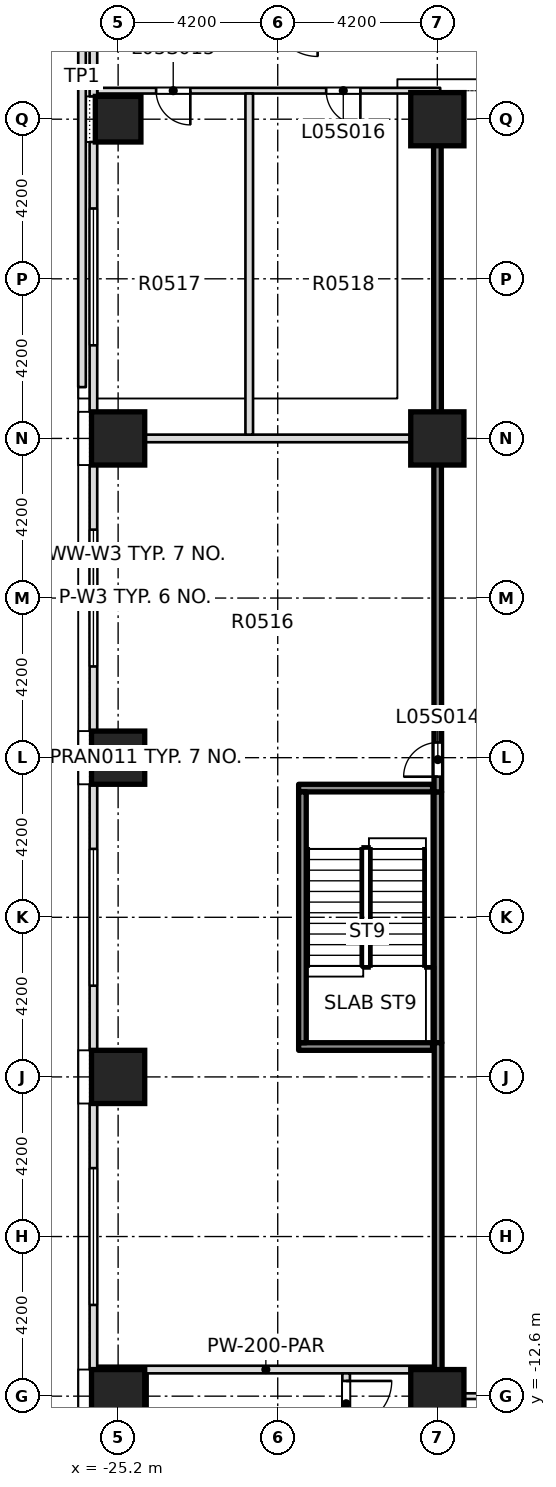
"""IFC4 building model, lengths in metres.
Left out: names, types, materials, properties, quantities, classifications, styles, units other than length and angle.
Written with IfcOpenShell. Run it as: python <this file> out.ifc"""

import sys

from ifc_helpers import new_model, si_unit, direction, frame, frame_2d, origin, origin_2d, place, context, subcontext, project, spatial, rectangle, extrude, element, fill, save


model = new_model("IFC4")
c1 = context("Model", 3, precision=1e-05, world=origin(), true_north=direction((0.0, 1.0)))
c2 = subcontext(c1, "Body", "Model", "MODEL_VIEW")
j1 = project(units=[si_unit("LENGTHUNIT", "METRE"), si_unit("PLANEANGLEUNIT", "RADIAN")], contexts=[c1])
p1 = place(None, origin())
s1 = spatial("IfcSite", under=j1, at=p1, CompositionType="ELEMENT")
p2 = place(p1, origin())
s2 = spatial("IfcBuilding", under=s1, at=p2, CompositionType="ELEMENT")
p3 = place(p2, frame((0.0, 0.0, 30.0)))
s3 = spatial("IfcBuildingStorey", under=s2, at=p3, CompositionType="ELEMENT", Elevation=30.0)
for number, where, z_axis, x_axis in (
    (1, (-25.2, -12.6, -0.4), (0.0, 0.0, 1.0), (1.0, 0.0, 0.0)),
    (2, (-16.8, -12.6, -0.4), (0.0, 0.0, 1.0), (1.0, 0.0, 0.0)),
    (3, (-25.2, -4.2, -0.4), (0.0, 0.0, 1.0), (1.0, 0.0, 0.0)),
    (4, (-25.2, 4.2, -0.4), (0.0, 0.0, 1.0), (1.0, 0.0, 0.0)),
    (5, (-25.2, 12.6, -0.4), (0.0, 0.0, 1.0), (1.0, 0.0, 0.0)),
    (6, (-16.8, 12.6, -0.4), (0.0, 0.0, 1.0), (1.0, 0.0, 0.0)),
    (7, (-16.8, 21.0, -0.4), (0.0, 0.0, 1.0), (1.0, 0.0, 0.0)),
):
    element("IfcColumn", number, at=place(p3, frame(where, z_axis=z_axis, x_axis=x_axis)), inside=s3, PredefinedType="COLUMN", context=c2, shape_type="SweptSolid", body=[
        extrude(rectangle(XDim=1.4, YDim=1.4, at=origin_2d()), origin(), (0.0, 0.0, 1.0), 4.58),
    ])
p4 = place(p3, frame((-25.2, 21.0, 0.0), z_axis=(0.0, 0.0, 1.0), x_axis=(1.0, 0.0, 0.0)))
e8 = element("IfcColumn", 8, at=p4, inside=s3, PredefinedType="COLUMN", context=c2, shape_type="SweptSolid", body=[
    extrude(rectangle(XDim=1.2, YDim=1.2, at=origin_2d()), origin(), (0.0, 0.0, 1.0), 4.18),
])
p5 = place(p3, frame((-26.15, 13.95, 4.5), z_axis=(0.0, 0.0, 1.0), x_axis=(0.0, 1.0, 0.0)))
e9 = element("IfcWall", 9, at=p5, inside=s3, PredefinedType="PARAPET", context=c2, shape_type="SweptSolid", body=[
    extrude(rectangle(XDim=16.3, YDim=0.2, at=frame_2d((8.15, 0.0))), origin(), (0.0, 0.0, 1.0), 1.2),
])
p6 = place(p3, frame((-16.9, -12.6, 0.0), z_axis=(0.0, 0.0, 1.0), x_axis=(1.0, 0.0, 0.0)))
e10 = element("IfcWall", 10, at=p6, inside=s3, PredefinedType="PARTITIONING", context=c2, shape_type="SweptSolid", body=[
    extrude(rectangle(XDim=9.625, YDim=0.15, at=frame_2d((4.812, 0.0))), origin(), (0.0, 0.0, 1.0), 4.18),
])
for number, where, z_axis, x_axis in (
    (11, (-25.75, -11.9, 0.0), (0.0, 0.0, 1.0), (1.0, 0.0, 0.0)),
    (12, (-25.75, 12.6, 0.0), (0.0, 0.0, 1.0), (1.0, 0.0, 0.0)),
):
    element("IfcWall", number, at=place(p3, frame(where, z_axis=z_axis, x_axis=x_axis)), inside=s3, PredefinedType="PARTITIONING", context=c2, shape_type="SweptSolid", body=[
        extrude(rectangle(XDim=8.875, YDim=0.2, at=frame_2d((4.438, 0.0))), origin(), (0.0, 0.0, 1.0), 4.18),
    ])
p7 = place(p3, frame((-25.75, 21.75, 0.0), z_axis=(0.0, 0.0, 1.0), x_axis=(1.0, 0.0, 0.0)))
e13 = element("IfcWall", 13, at=p7, inside=s3, PredefinedType="PARTITIONING", context=c2, shape_type="SweptSolid", body=[
    extrude(rectangle(XDim=9.025, YDim=0.15, at=frame_2d((4.512, 0.0))), origin(), (0.0, 0.0, 1.0), 4.18),
])
p8 = place(p7, frame((1.55, 0.0, 0.0)))
e14 = element("IfcOpeningElement", 14, at=p8, cuts=e13, PredefinedType="OPENING", context=c2, shape_type="SweptSolid", body=[
    extrude(rectangle(XDim=0.9, YDim=2.1, at=frame_2d((0.45, 1.05))), frame((0.0, 0.085, 0.0), z_axis=(0.0, -1.0, 0.0), x_axis=(1.0, 0.0, 0.0)), (0.0, 0.0, 1.0), 0.17),
])
p9 = place(p7, frame((6.025, 0.0, 0.0)))
e15 = element("IfcOpeningElement", 15, at=p9, cuts=e13, PredefinedType="OPENING", context=c2, shape_type="SweptSolid", body=[
    extrude(rectangle(XDim=0.9, YDim=2.1, at=frame_2d((0.45, 1.05))), frame((0.0, 0.085, 0.0), z_axis=(0.0, -1.0, 0.0), x_axis=(1.0, 0.0, 0.0)), (0.0, 0.0, 1.0), 0.17),
])
p10 = place(p3, frame((-21.75, 12.7, 0.0), z_axis=(0.0, 0.0, 1.0), x_axis=(0.0, 1.0, 0.0)))
e16 = element("IfcWall", 16, at=p10, inside=s3, PredefinedType="PARTITIONING", context=c2, shape_type="SweptSolid", body=[
    extrude(rectangle(XDim=8.975, YDim=0.2, at=frame_2d((4.488, 0.0))), origin(), (0.0, 0.0, 1.0), 4.18),
])
p11 = place(p3, frame((-19.2, -18.125, 0.0), z_axis=(0.0, 0.0, 1.0), x_axis=(0.0, 1.0, 0.0)))
e17 = element("IfcWall", 17, at=p11, inside=s3, PredefinedType="PARTITIONING", context=c2, shape_type="SweptSolid", body=[
    extrude(rectangle(XDim=6.125, YDim=0.2, at=frame_2d((3.062, 0.0))), origin(), (0.0, 0.0, 1.0), 4.18),
])
p12 = place(p11, frame((4.725, 0.0, 0.0)))
e18 = element("IfcOpeningElement", 18, at=p12, cuts=e17, PredefinedType="OPENING", context=c2, shape_type="SweptSolid", body=[
    extrude(rectangle(XDim=1.2, YDim=2.1, at=frame_2d((0.6, 1.05))), frame((0.0, 0.11, 0.0), z_axis=(0.0, -1.0, 0.0), x_axis=(1.0, 0.0, 0.0)), (0.0, 0.0, 1.0), 0.22),
])
p13 = place(p3, frame((-16.8, -18.125, 0.0), z_axis=(0.0, 0.0, 1.0), x_axis=(0.0, 1.0, 0.0)))
e19 = element("IfcWall", 19, at=p13, inside=s3, PredefinedType="PARTITIONING", context=c2, shape_type="SweptSolid", body=[
    extrude(rectangle(XDim=5.45, YDim=0.2, at=frame_2d((2.725, 0.0))), origin(), (0.0, 0.0, 1.0), 4.18),
])
p14 = place(p3, frame((-16.782, -3.3, 0.0), z_axis=(0.0, 0.0, 1.0), x_axis=(-0.000739808927, 0.999999726341, 0.0)))
e20 = element("IfcWall", 20, at=p14, inside=s3, PredefinedType="SOLIDWALL", context=c2, shape_type="SweptSolid", body=[
    extrude(rectangle(XDim=6.6, YDim=0.2, at=frame_2d((3.3, 0.0))), origin(), (0.0, 0.0, 1.0), 4.18),
])
p15 = place(p3, frame((-25.85, 28.8, 0.0), z_axis=(0.0, 0.0, 1.0), x_axis=(0.0, -1.0, 0.0)))
e21 = element("IfcWall", 21, at=p15, inside=s3, PredefinedType="STANDARD", context=c2, shape_type="SweptSolid", body=[
    extrude(rectangle(XDim=7.2, YDim=0.2, at=frame_2d((3.6, 0.0))), origin(), (0.0, 0.0, 1.0), 4.18),
])
p16 = place(p15, frame((1.17, 0.0, 0.9)))
e22 = element("IfcOpeningElement", 22, at=p16, cuts=e21, PredefinedType="OPENING", context=c2, shape_type="SweptSolid", body=[
    extrude(rectangle(XDim=3.6, YDim=2.4, at=frame_2d((1.8, 1.2))), frame((0.0, 0.11, 0.0), z_axis=(0.0, -1.0, 0.0), x_axis=(1.0, 0.0, 0.0)), (0.0, 0.0, 1.0), 0.22),
])
p17 = place(p3, frame((-25.85, 20.4, 0.0), z_axis=(0.0, 0.0, 1.0), x_axis=(0.0, -1.0, 0.0)))
e23 = element("IfcWall", 23, at=p17, inside=s3, PredefinedType="STANDARD", context=c2, shape_type="SweptSolid", body=[
    extrude(rectangle(XDim=7.1, YDim=0.2, at=frame_2d((3.55, 0.0))), origin(), (0.0, 0.0, 1.0), 4.18),
])
p18 = place(p17, frame((1.75, 0.0, 0.9)))
e24 = element("IfcOpeningElement", 24, at=p18, cuts=e23, PredefinedType="OPENING", context=c2, shape_type="SweptSolid", body=[
    extrude(rectangle(XDim=3.6, YDim=2.4, at=frame_2d((1.8, 1.2))), frame((0.0, 0.11, 0.0), z_axis=(0.0, -1.0, 0.0), x_axis=(1.0, 0.0, 0.0)), (0.0, 0.0, 1.0), 0.22),
])
p19 = place(p3, frame((-25.85, 11.9, 0.0), z_axis=(0.0, 0.0, 1.0), x_axis=(0.0, -1.0, 0.0)))
e25 = element("IfcWall", 25, at=p19, inside=s3, PredefinedType="STANDARD", context=c2, shape_type="SweptSolid", body=[
    extrude(rectangle(XDim=7.0, YDim=0.2, at=frame_2d((3.5, 0.0))), origin(), (0.0, 0.0, 1.0), 4.18),
])
p20 = place(p19, frame((1.7, 0.0, 0.9)))
e26 = element("IfcOpeningElement", 26, at=p20, cuts=e25, PredefinedType="OPENING", context=c2, shape_type="SweptSolid", body=[
    extrude(rectangle(XDim=3.6, YDim=2.4, at=frame_2d((1.8, 1.2))), frame((0.0, 0.11, 0.0), z_axis=(0.0, -1.0, 0.0), x_axis=(1.0, 0.0, 0.0)), (0.0, 0.0, 1.0), 0.22),
])
p21 = place(p3, frame((-25.85, 3.5, 0.0), z_axis=(0.0, 0.0, 1.0), x_axis=(0.0, -1.0, 0.0)))
e27 = element("IfcWall", 27, at=p21, inside=s3, PredefinedType="STANDARD", context=c2, shape_type="SweptSolid", body=[
    extrude(rectangle(XDim=7.0, YDim=0.2, at=frame_2d((3.5, 0.0))), origin(), (0.0, 0.0, 1.0), 4.18),
])
p22 = place(p21, frame((1.7, 0.0, 0.9)))
e28 = element("IfcOpeningElement", 28, at=p22, cuts=e27, PredefinedType="OPENING", context=c2, shape_type="SweptSolid", body=[
    extrude(rectangle(XDim=3.6, YDim=2.4, at=frame_2d((1.8, 1.2))), frame((0.0, 0.11, 0.0), z_axis=(0.0, -1.0, 0.0), x_axis=(1.0, 0.0, 0.0)), (0.0, 0.0, 1.0), 0.22),
])
p23 = place(p3, frame((-25.85, -4.9, 0.0), z_axis=(0.0, 0.0, 1.0), x_axis=(0.0, -1.0, 0.0)))
e29 = element("IfcWall", 29, at=p23, inside=s3, PredefinedType="STANDARD", context=c2, shape_type="SweptSolid", body=[
    extrude(rectangle(XDim=7.0, YDim=0.2, at=frame_2d((3.5, 0.0))), origin(), (0.0, 0.0, 1.0), 4.18),
])
p24 = place(p23, frame((1.7, 0.0, 0.9)))
e30 = element("IfcOpeningElement", 30, at=p24, cuts=e29, PredefinedType="OPENING", context=c2, shape_type="SweptSolid", body=[
    extrude(rectangle(XDim=3.6, YDim=2.4, at=frame_2d((1.8, 1.2))), frame((0.0, 0.11, 0.0), z_axis=(0.0, -1.0, 0.0), x_axis=(1.0, 0.0, 0.0)), (0.0, 0.0, 1.0), 0.22),
])
for number, where, z_axis, x_axis in (
    (31, (-20.45, -3.4, 0.0), (0.0, 0.0, 1.0), (1.0, 0.0, 0.0)),
    (32, (-20.45, 3.4, 0.0), (0.0, 0.0, 1.0), (1.0, 0.0, 0.0)),
):
    element("IfcWall", number, at=place(p3, frame(where, z_axis=z_axis, x_axis=x_axis)), inside=s3, PredefinedType="SOLIDWALL", context=c2, shape_type="SweptSolid", body=[
        extrude(rectangle(XDim=3.525, YDim=0.2, at=frame_2d((1.762, 0.0))), origin(), (0.0, 0.0, 1.0), 4.18),
    ])
p25 = place(p3, frame((-16.775, -12.525, 0.0), z_axis=(0.0, 0.0, 1.0), x_axis=(-0.000714569091, 0.999999744695, 0.0)))
e33 = element("IfcWall", 33, at=p25, inside=s3, PredefinedType="SOLIDWALL", context=c2, shape_type="SweptSolid", body=[
    extrude(rectangle(XDim=9.225, YDim=0.2, at=frame_2d((4.612, 0.0))), origin(), (0.0, 0.0, 1.0), 4.18),
])
p26 = place(p3, frame((-16.787, 3.3, 0.0), z_axis=(0.0, 0.0, 1.0), x_axis=(-0.000729771851, 0.999999733716, 0.0)))
e34 = element("IfcWall", 34, at=p26, inside=s3, PredefinedType="SOLIDWALL", context=c2, shape_type="SweptSolid", body=[
    extrude(rectangle(XDim=18.4, YDim=0.2, at=frame_2d((9.2, 0.0))), origin(), (0.0, 0.0, 1.0), 4.18),
])
p27 = place(p26, frame((0.4, 0.0, 0.0)))
e35 = element("IfcOpeningElement", 35, at=p27, cuts=e34, PredefinedType="OPENING", context=c2, shape_type="SweptSolid", body=[
    extrude(rectangle(XDim=0.9, YDim=2.1, at=frame_2d((0.45, 1.05))), frame((0.0, 0.11, 0.0), z_axis=(0.0, -1.0, 0.0), x_axis=(1.0, 0.0, 0.0)), (0.0, 0.0, 1.0), 0.22),
])
p28 = place(p3, frame((-20.35, -3.3, 0.0), z_axis=(0.0, 0.0, 1.0), x_axis=(0.0, 1.0, 0.0)))
e36 = element("IfcWall", 36, at=p28, inside=s3, PredefinedType="SOLIDWALL", context=c2, shape_type="SweptSolid", body=[
    extrude(rectangle(XDim=6.6, YDim=0.2, at=frame_2d((3.3, 0.0))), origin(), (0.0, 0.0, 1.0), 4.18),
])
p29 = place(p12, origin())
e37 = element("IfcDoor", 37, at=p29, inside=s3, OperationType="DOUBLE_DOOR_SINGLE_SWING", PredefinedType="DOOR", context=c2, shape_type="SweptSolid", body=[
    extrude(rectangle(XDim=1.2, YDim=2.1, at=frame_2d((0.6, 1.05))), frame((0.0, 0.025, 0.0), z_axis=(0.0, -1.0, 0.0), x_axis=(1.0, 0.0, 0.0)), (0.0, 0.0, 1.0), 0.05),
])
fill(e18, e37)
p30 = place(p27, origin())
e38 = element("IfcDoor", 38, at=p30, inside=s3, OperationType="SINGLE_SWING_LEFT", PredefinedType="DOOR", context=c2, shape_type="SweptSolid", body=[
    extrude(rectangle(XDim=0.9, YDim=2.1, at=frame_2d((0.45, 1.05))), frame((0.0, 0.025, 0.0), z_axis=(0.0, -1.0, 0.0), x_axis=(1.0, 0.0, 0.0)), (0.0, 0.0, 1.0), 0.05),
])
fill(e35, e38)
p31 = place(p8, origin())
e39 = element("IfcDoor", 39, at=p31, inside=s3, OperationType="SINGLE_SWING_LEFT", PredefinedType="DOOR", context=c2, shape_type="SweptSolid", body=[
    extrude(rectangle(XDim=0.9, YDim=2.1, at=frame_2d((0.45, 1.05))), frame((0.0, 0.025, 0.0), z_axis=(0.0, -1.0, 0.0), x_axis=(1.0, 0.0, 0.0)), (0.0, 0.0, 1.0), 0.05),
])
fill(e14, e39)
p32 = place(p9, origin())
e40 = element("IfcDoor", 40, at=p32, inside=s3, OperationType="SINGLE_SWING_RIGHT", PredefinedType="DOOR", context=c2, shape_type="SweptSolid", body=[
    extrude(rectangle(XDim=0.9, YDim=2.1, at=frame_2d((0.45, 1.05))), frame((0.0, 0.025, 0.0), z_axis=(0.0, -1.0, 0.0), x_axis=(1.0, 0.0, 0.0)), (0.0, 0.0, 1.0), 0.05),
])
fill(e15, e40)
p33 = place(p18, origin())
e41 = element("IfcWindow", 41, at=p33, inside=s3, PartitioningType="SINGLE_PANEL", PredefinedType="WINDOW", context=c2, shape_type="SweptSolid", body=[
    extrude(rectangle(XDim=3.6, YDim=2.4, at=frame_2d((1.8, 1.2))), frame((0.0, 0.03, 0.0), z_axis=(0.0, -1.0, 0.0), x_axis=(1.0, 0.0, 0.0)), (0.0, 0.0, 1.0), 0.06),
])
fill(e24, e41)
p34 = place(p20, origin())
e42 = element("IfcWindow", 42, at=p34, inside=s3, PartitioningType="SINGLE_PANEL", PredefinedType="WINDOW", context=c2, shape_type="SweptSolid", body=[
    extrude(rectangle(XDim=3.6, YDim=2.4, at=frame_2d((1.8, 1.2))), frame((0.0, 0.03, 0.0), z_axis=(0.0, -1.0, 0.0), x_axis=(1.0, 0.0, 0.0)), (0.0, 0.0, 1.0), 0.06),
])
fill(e26, e42)
p35 = place(p22, origin())
e43 = element("IfcWindow", 43, at=p35, inside=s3, PartitioningType="SINGLE_PANEL", PredefinedType="WINDOW", context=c2, shape_type="SweptSolid", body=[
    extrude(rectangle(XDim=3.6, YDim=2.4, at=frame_2d((1.8, 1.2))), frame((0.0, 0.03, 0.0), z_axis=(0.0, -1.0, 0.0), x_axis=(1.0, 0.0, 0.0)), (0.0, 0.0, 1.0), 0.06),
])
fill(e28, e43)
p36 = place(p24, origin())
e44 = element("IfcWindow", 44, at=p36, inside=s3, PartitioningType="SINGLE_PANEL", PredefinedType="WINDOW", context=c2, shape_type="SweptSolid", body=[
    extrude(rectangle(XDim=3.6, YDim=2.4, at=frame_2d((1.8, 1.2))), frame((0.0, 0.03, 0.0), z_axis=(0.0, -1.0, 0.0), x_axis=(1.0, 0.0, 0.0)), (0.0, 0.0, 1.0), 0.06),
])
fill(e30, e44)
save(model, sys.argv[1])
